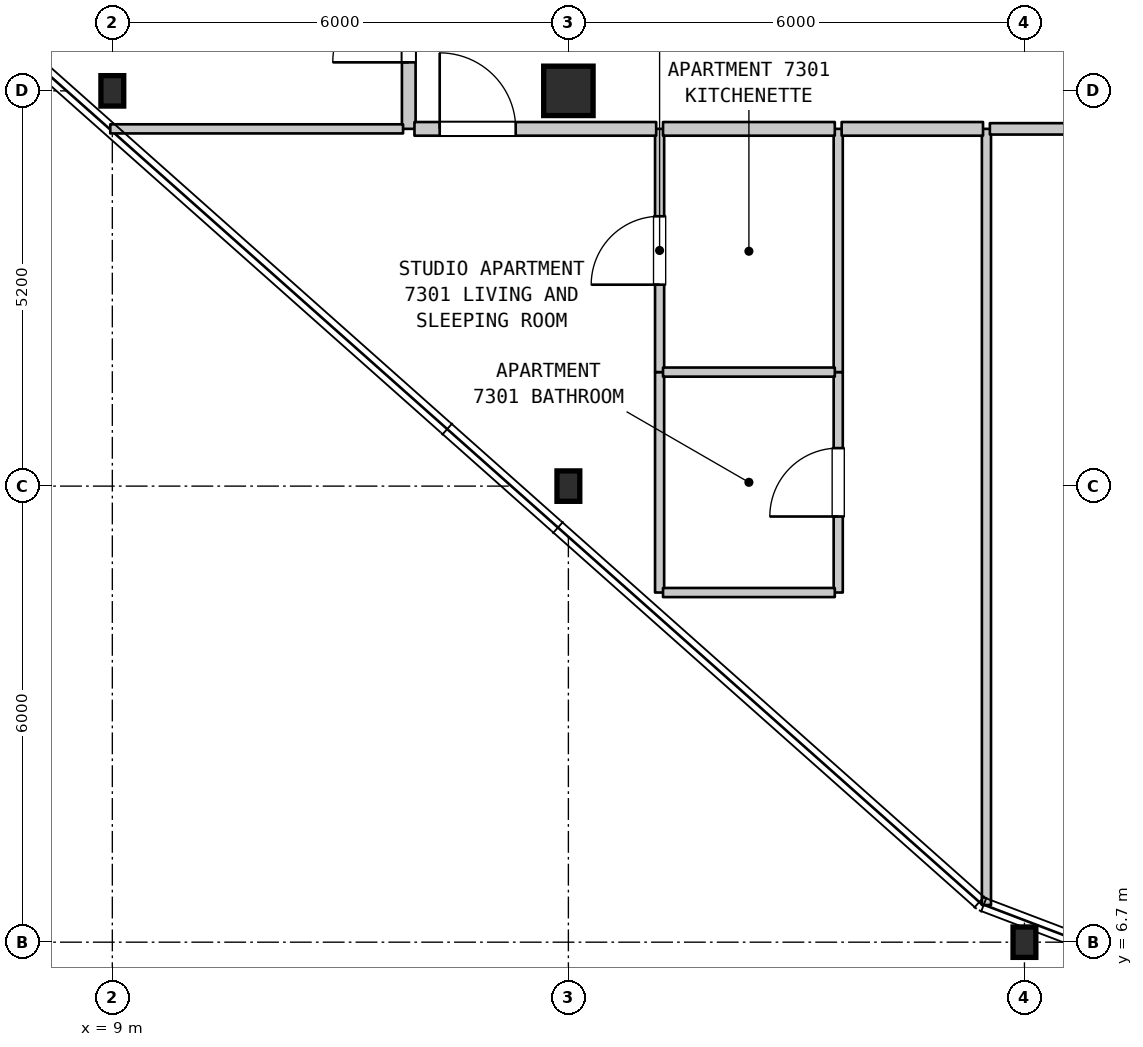
"""IFC4 building model, lengths in metres.
Left out: names, types, materials, properties, quantities, classifications, styles, units other than length and angle.
Written with IfcOpenShell. Run it as: python <this file> out.ifc"""

import sys

from ifc_helpers import new_model, si_unit, direction, frame, frame_2d, origin, origin_2d, place, context, subcontext, project, spatial, rectangle, i_section, extrude, element, fill, save


model = new_model("IFC4")
c1 = context("Model", 3, precision=1e-05, world=origin(), true_north=direction((0.0, 1.0)))
c2 = subcontext(c1, "Body", "Model", "MODEL_VIEW")
j1 = project(units=[si_unit("LENGTHUNIT", "METRE"), si_unit("PLANEANGLEUNIT", "RADIAN")], contexts=[c1])
p1 = place(None, origin())
s1 = spatial("IfcSite", under=j1, at=p1, CompositionType="ELEMENT")
p2 = place(p1, origin())
s2 = spatial("IfcBuilding", under=s1, at=p2, CompositionType="ELEMENT")
p3 = place(p2, frame((0.0, 0.0, 291.7)))
s3 = spatial("IfcBuildingStorey", under=s2, at=p3, CompositionType="ELEMENT", Elevation=291.7)
for number, where, z_axis, x_axis in (
    (1, (9.0, 17.9, 0.0), (0.0, 0.0, 1.0), (1.0, 0.0, 0.0)),
    (2, (15.0, 12.7, 0.0), (0.0, 0.0, 1.0), (1.0, 0.0, 0.0)),
):
    element("IfcColumn", number, at=place(p3, frame(where, z_axis=z_axis, x_axis=x_axis)), inside=s3, PredefinedType="COLUMN", context=c2, shape_type="SweptSolid", body=[
        extrude(i_section(OverallWidth=0.3, OverallDepth=0.4, WebThickness=0.013, FlangeThickness=0.024, FilletRadius=0.027, at=origin_2d()), origin(), (0.0, 0.0, 1.0), 3.7),
    ])
p4 = place(p3, frame((15.0, 17.9, 0.0), z_axis=(0.0, 0.0, 1.0), x_axis=(1.0, 0.0, 0.0)))
e3 = element("IfcColumn", 3, at=p4, inside=s3, PredefinedType="COLUMN", context=c2, shape_type="SweptSolid", body=[
    extrude(rectangle(XDim=0.65, YDim=0.65, at=origin_2d()), origin(), (0.0, 0.0, 1.0), 3.7),
])
p5 = place(p3, frame((21.0, 6.7, 0.0), z_axis=(0.0, 0.0, 1.0), x_axis=(1.0, 0.0, 0.0)))
e4 = element("IfcColumn", 4, at=p5, inside=s3, PredefinedType="COLUMN", context=c2, shape_type="SweptSolid", body=[
    extrude(i_section(OverallWidth=0.3, OverallDepth=0.4, WebThickness=0.013, FlangeThickness=0.024, FilletRadius=0.027, at=origin_2d()), origin(), (0.0, 0.0, 1.0), 3.7),
])
p6 = place(p3, frame((12.9, 17.4, 0.0), z_axis=(0.0, 0.0, 1.0), x_axis=(0.0, 1.0, 0.0)))
e5 = element("IfcWall", 5, at=p6, inside=s3, PredefinedType="STANDARD", context=c2, shape_type="SweptSolid", body=[
    extrude(rectangle(XDim=2.75, YDim=0.18, at=frame_2d((1.375, 0.0))), origin(), (0.0, 0.0, 1.0), 3.39),
])
p7 = place(p6, frame((0.875, 0.0, 0.0)))
e6 = element("IfcOpeningElement", 6, at=p7, cuts=e5, PredefinedType="OPENING", context=c2, shape_type="SweptSolid", body=[
    extrude(rectangle(XDim=1.0, YDim=2.15, at=frame_2d((0.5, 1.075))), frame((0.0, 0.1, 0.0), z_axis=(0.0, -1.0, 0.0), x_axis=(1.0, 0.0, 0.0)), (0.0, 0.0, 1.0), 0.2),
])
p8 = place(p3, frame((16.2, 11.3, 0.0), z_axis=(0.0, 0.0, 1.0), x_axis=(0.0, 1.0, 0.0)))
e7 = element("IfcWall", 7, at=p8, inside=s3, PredefinedType="PARTITIONING", context=c2, shape_type="SweptSolid", body=[
    extrude(rectangle(XDim=2.9, YDim=0.12, at=frame_2d((1.45, 0.0))), origin(), (0.0, 0.0, 1.0), 3.39),
])
p9 = place(p3, frame((16.2, 14.2, 0.0), z_axis=(0.0, 0.0, 1.0), x_axis=(0.0, 1.0, 0.0)))
e8 = element("IfcWall", 8, at=p9, inside=s3, PredefinedType="PARTITIONING", context=c2, shape_type="SweptSolid", body=[
    extrude(rectangle(XDim=3.2, YDim=0.12, at=frame_2d((1.6, 0.0))), origin(), (0.0, 0.0, 1.0), 3.39),
])
p10 = place(p9, frame((1.15, 0.0, 0.0)))
e9 = element("IfcOpeningElement", 9, at=p10, cuts=e8, PredefinedType="OPENING", context=c2, shape_type="SweptSolid", body=[
    extrude(rectangle(XDim=0.9, YDim=2.15, at=frame_2d((0.45, 1.075))), frame((0.0, 0.07, 0.0), z_axis=(0.0, -1.0, 0.0), x_axis=(1.0, 0.0, 0.0)), (0.0, 0.0, 1.0), 0.14),
])
p11 = place(p3, frame((18.55, 11.3, 0.0), z_axis=(0.0, 0.0, 1.0), x_axis=(0.0, 1.0, 0.0)))
e10 = element("IfcWall", 10, at=p11, inside=s3, PredefinedType="PARTITIONING", context=c2, shape_type="SweptSolid", body=[
    extrude(rectangle(XDim=2.9, YDim=0.12, at=frame_2d((1.45, 0.0))), origin(), (0.0, 0.0, 1.0), 3.39),
])
p12 = place(p11, frame((1.0, 0.0, 0.0)))
e11 = element("IfcOpeningElement", 11, at=p12, cuts=e10, PredefinedType="OPENING", context=c2, shape_type="SweptSolid", body=[
    extrude(rectangle(XDim=0.9, YDim=2.1, at=frame_2d((0.45, 1.05))), frame((0.0, 0.07, 0.0), z_axis=(0.0, -1.0, 0.0), x_axis=(1.0, 0.0, 0.0)), (0.0, 0.0, 1.0), 0.14),
])
p13 = place(p3, frame((18.55, 14.2, 0.0), z_axis=(0.0, 0.0, 1.0), x_axis=(0.0, 1.0, 0.0)))
e12 = element("IfcWall", 12, at=p13, inside=s3, PredefinedType="PARTITIONING", context=c2, shape_type="SweptSolid", body=[
    extrude(rectangle(XDim=3.2, YDim=0.12, at=frame_2d((1.6, 0.0))), origin(), (0.0, 0.0, 1.0), 3.39),
])
p14 = place(p3, frame((20.5, 7.189, 0.0), z_axis=(0.0, 0.0, 1.0), x_axis=(0.0, 1.0, 0.0)))
e13 = element("IfcWall", 13, at=p14, inside=s3, PredefinedType="PARTITIONING", context=c2, shape_type="SweptSolid", body=[
    extrude(rectangle(XDim=10.211, YDim=0.12, at=frame_2d((5.105, 0.0))), origin(), (0.0, 0.0, 1.0), 3.39),
])
for number, where, z_axis, x_axis in (
    (14, (16.245, 11.3, 0.0), (0.0, 0.0, 1.0), (1.0, 0.0, 0.0)),
    (15, (16.245, 14.2, 0.0), (0.0, 0.0, 1.0), (1.0, 0.0, 0.0)),
):
    element("IfcWall", number, at=place(p3, frame(where, z_axis=z_axis, x_axis=x_axis)), inside=s3, PredefinedType="PARTITIONING", context=c2, shape_type="SweptSolid", body=[
        extrude(rectangle(XDim=2.26, YDim=0.12, at=frame_2d((1.13, 0.0))), origin(), (0.0, 0.0, 1.0), 3.39),
    ])
p15 = place(p3, frame((8.973, 17.4, 0.0), z_axis=(0.0, 0.0, 1.0), x_axis=(1.0, 0.0, 0.0)))
e16 = element("IfcWall", 16, at=p15, inside=s3, PredefinedType="PARTITIONING", context=c2, shape_type="SweptSolid", body=[
    extrude(rectangle(XDim=3.852, YDim=0.12, at=frame_2d((1.926, 0.0))), origin(), (0.0, 0.0, 1.0), 3.39),
])
p16 = place(p3, frame((12.975, 17.4, 0.0), z_axis=(0.0, 0.0, 1.0), x_axis=(1.0, 0.0, 0.0)))
e17 = element("IfcWall", 17, at=p16, inside=s3, PredefinedType="STANDARD", context=c2, shape_type="SweptSolid", body=[
    extrude(rectangle(XDim=3.18, YDim=0.18, at=frame_2d((1.59, 0.0))), origin(), (0.0, 0.0, 1.0), 3.39),
])
p17 = place(p16, frame((0.332, 0.0, 0.0)))
e18 = element("IfcOpeningElement", 18, at=p17, cuts=e17, PredefinedType="OPENING", context=c2, shape_type="SweptSolid", body=[
    extrude(rectangle(XDim=1.0, YDim=2.15, at=frame_2d((0.5, 1.075))), frame((0.0, 0.1, 0.0), z_axis=(0.0, -1.0, 0.0), x_axis=(1.0, 0.0, 0.0)), (0.0, 0.0, 1.0), 0.2),
])
p18 = place(p3, frame((16.245, 17.4, 0.0), z_axis=(0.0, 0.0, 1.0), x_axis=(1.0, 0.0, 0.0)))
e19 = element("IfcWall", 19, at=p18, inside=s3, PredefinedType="STANDARD", context=c2, shape_type="SweptSolid", body=[
    extrude(rectangle(XDim=2.26, YDim=0.18, at=frame_2d((1.13, 0.0))), origin(), (0.0, 0.0, 1.0), 3.39),
])
p19 = place(p3, frame((18.595, 17.4, 0.0), z_axis=(0.0, 0.0, 1.0), x_axis=(1.0, 0.0, 0.0)))
e20 = element("IfcWall", 20, at=p19, inside=s3, PredefinedType="STANDARD", context=c2, shape_type="SweptSolid", body=[
    extrude(rectangle(XDim=1.86, YDim=0.18, at=frame_2d((0.93, 0.0))), origin(), (0.0, 0.0, 1.0), 3.39),
])
p20 = place(p3, frame((20.545, 17.4, 0.0), z_axis=(0.0, 0.0, 1.0), x_axis=(1.0, 0.0, 0.0)))
e21 = element("IfcWall", 21, at=p20, inside=s3, PredefinedType="STANDARD", context=c2, shape_type="SweptSolid", body=[
    extrude(rectangle(XDim=4.91, YDim=0.15, at=frame_2d((2.455, 0.0))), origin(), (0.0, 0.0, 1.0), 3.39),
])
p21 = place(p20, frame((1.884, 0.0, 0.0)))
e22 = element("IfcOpeningElement", 22, at=p21, cuts=e21, PredefinedType="OPENING", context=c2, shape_type="SweptSolid", body=[
    extrude(rectangle(XDim=1.0, YDim=2.15, at=frame_2d((0.5, 1.075))), frame((0.0, 0.085, 0.0), z_axis=(0.0, -1.0, 0.0), x_axis=(1.0, 0.0, 0.0)), (0.0, 0.0, 1.0), 0.17),
])
p22 = place(p7, origin())
e23 = element("IfcDoor", 23, at=p22, inside=s3, OperationType="SINGLE_SWING_LEFT", PredefinedType="DOOR", context=c2, shape_type="SweptSolid", body=[
    extrude(rectangle(XDim=1.0, YDim=2.15, at=frame_2d((0.5, 1.075))), frame((0.0, 0.025, 0.0), z_axis=(0.0, -1.0, 0.0), x_axis=(1.0, 0.0, 0.0)), (0.0, 0.0, 1.0), 0.05),
])
fill(e6, e23)
p23 = place(p10, origin())
e24 = element("IfcDoor", 24, at=p23, inside=s3, OperationType="SINGLE_SWING_LEFT", PredefinedType="DOOR", context=c2, shape_type="SweptSolid", body=[
    extrude(rectangle(XDim=0.9, YDim=2.15, at=frame_2d((0.45, 1.075))), frame((0.0, 0.025, 0.0), z_axis=(0.0, -1.0, 0.0), x_axis=(1.0, 0.0, 0.0)), (0.0, 0.0, 1.0), 0.05),
])
fill(e9, e24)
p24 = place(p12, origin())
e25 = element("IfcDoor", 25, at=p24, inside=s3, OperationType="SINGLE_SWING_LEFT", PredefinedType="DOOR", context=c2, shape_type="SweptSolid", body=[
    extrude(rectangle(XDim=0.9, YDim=2.1, at=frame_2d((0.45, 1.05))), frame((0.0, 0.025, 0.0), z_axis=(0.0, -1.0, 0.0), x_axis=(1.0, 0.0, 0.0)), (0.0, 0.0, 1.0), 0.05),
])
fill(e11, e25)
p25 = place(p17, origin())
e26 = element("IfcDoor", 26, at=p25, inside=s3, OperationType="SINGLE_SWING_LEFT", PredefinedType="DOOR", context=c2, shape_type="SweptSolid", body=[
    extrude(rectangle(XDim=1.0, YDim=2.15, at=frame_2d((0.5, 1.075))), frame((0.0, 0.025, 0.0), z_axis=(0.0, -1.0, 0.0), x_axis=(1.0, 0.0, 0.0)), (0.0, 0.0, 1.0), 0.05),
])
fill(e18, e26)
save(model, sys.argv[1])
